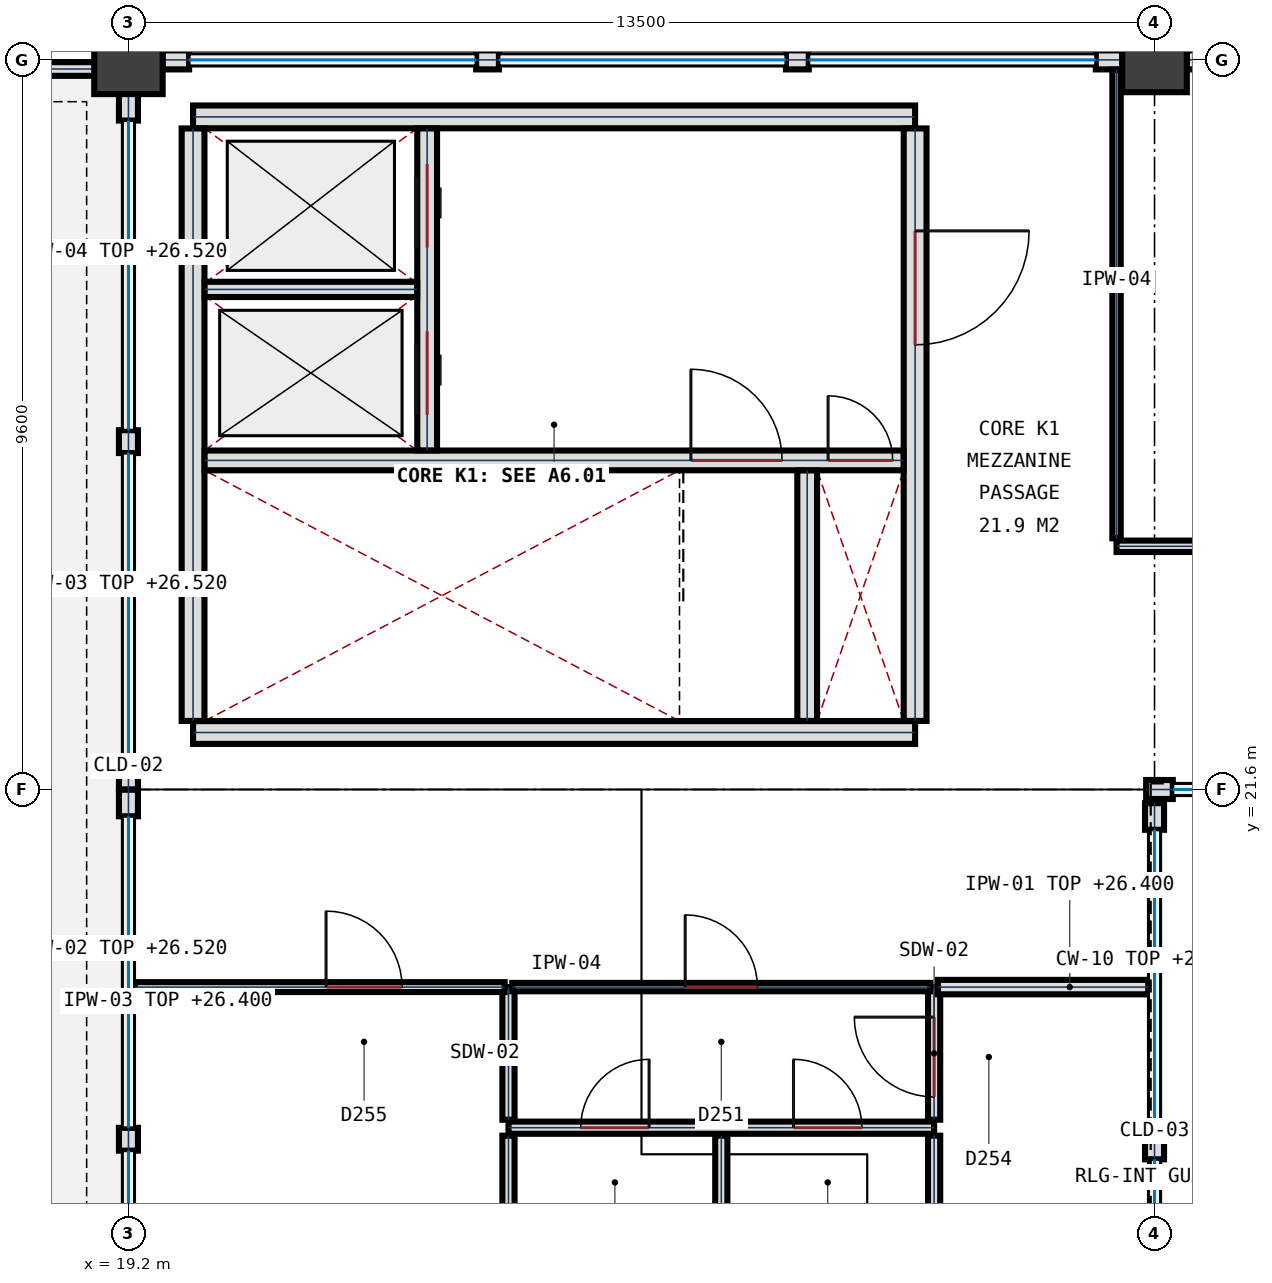
"""IFC4 building model, lengths in metres.
Left out: names, types, materials, properties, quantities, classifications, styles, units other than length and angle.
Written with IfcOpenShell. Run it as: python <this file> out.ifc"""

import sys

from ifc_helpers import new_model, si_unit, direction, frame, frame_2d, origin, origin_2d, place, context, subcontext, project, spatial, rectangle, circle, extrude, element, fill, save


model = new_model("IFC4")
c1 = context("Model", 3, precision=1e-05, world=origin(), true_north=direction((0.0, 1.0)))
c2 = subcontext(c1, "Body", "Model", "MODEL_VIEW")
j1 = project(units=[si_unit("LENGTHUNIT", "METRE"), si_unit("PLANEANGLEUNIT", "RADIAN")], contexts=[c1])
p1 = place(None, origin())
s1 = spatial("IfcSite", under=j1, at=p1, CompositionType="ELEMENT")
p2 = place(p1, origin())
s2 = spatial("IfcBuilding", under=s1, at=p2, CompositionType="ELEMENT")
p3 = place(p2, frame((0.0, 0.0, 23.4)))
s3 = spatial("IfcBuildingStorey", under=s2, at=p3, CompositionType="ELEMENT", Elevation=23.4)
p4 = place(p3, frame((19.2, 31.2, 0.0), z_axis=(0.0, 0.0, 1.0), x_axis=(1.0, 0.0, 0.0)))
e1 = element("IfcColumn", 1, at=p4, inside=s3, PredefinedType="COLUMN", context=c2, shape_type="SweptSolid", body=[
    extrude(circle(Radius=0.45, at=origin_2d()), origin(), (0.0, 0.0, 1.0), 4.5),
])
p5 = place(p3, frame((32.7, 31.2, 0.0), z_axis=(0.0, 0.0, 1.0), x_axis=(1.0, 0.0, 0.0)))
e2 = element("IfcColumn", 2, at=p5, inside=s3, PredefinedType="COLUMN", context=c2, shape_type="SweptSolid", body=[
    extrude(rectangle(XDim=0.85, YDim=0.85, at=origin_2d()), origin(), (0.0, 0.0, 1.0), 4.5),
])
p6 = place(p3, frame((19.2, 21.248, 0.0), z_axis=(0.0, 0.0, 1.0), x_axis=(0.0, 1.0, 0.0)))
e3 = element("IfcWall", 3, at=p6, inside=s3, PredefinedType="SOLIDWALL", context=c2, shape_type="SweptSolid", body=[
    extrude(rectangle(XDim=0.35, YDim=0.25, at=frame_2d((0.175, 0.0))), origin(), (0.0, 0.0, 1.0), 3.12),
])
p7 = place(p3, frame((19.2, 16.848, 0.0), z_axis=(0.0, 0.0, 1.0), x_axis=(0.0, 1.0, 0.0)))
e4 = element("IfcWall", 4, at=p7, inside=s3, PredefinedType="SOLIDWALL", context=c2, shape_type="SweptSolid", body=[
    extrude(rectangle(XDim=0.3, YDim=0.25, at=frame_2d((0.15, 0.0))), origin(), (0.0, 0.0, 1.0), 3.12),
])
for number, where, z_axis, x_axis in (
    (5, (19.2, 21.602, 0.0), (0.0, 0.0, 1.0), (0.0, 1.0, 0.0)),
    (6, (19.2, 30.402, 0.0), (0.0, 0.0, 1.0), (0.0, 1.0, 0.0)),
):
    element("IfcWall", number, at=place(p3, frame(where, z_axis=z_axis, x_axis=x_axis)), inside=s3, PredefinedType="SOLIDWALL", context=c2, shape_type="SweptSolid", body=[
        extrude(rectangle(XDim=0.35, YDim=0.25, at=frame_2d((0.175, 0.0))), origin(), (0.0, 0.0, 1.0), 3.12),
    ])
p8 = place(p3, frame((19.2, 26.027, 0.0), z_axis=(0.0, 0.0, 1.0), x_axis=(0.0, 1.0, 0.0)))
e7 = element("IfcWall", 7, at=p8, inside=s3, PredefinedType="SOLIDWALL", context=c2, shape_type="SweptSolid", body=[
    extrude(rectangle(XDim=0.3, YDim=0.25, at=frame_2d((0.15, 0.0))), origin(), (0.0, 0.0, 1.0), 3.12),
])
for number, where, z_axis, x_axis in (
    (8, (19.648, 31.2, 0.0), (0.0, 0.0, 1.0), (1.0, 0.0, 0.0)),
    (9, (31.927, 31.2, 0.0), (0.0, 0.0, 1.0), (1.0, 0.0, 0.0)),
):
    element("IfcWall", number, at=place(p3, frame(where, z_axis=z_axis, x_axis=x_axis)), inside=s3, PredefinedType="SOLIDWALL", context=c2, shape_type="SweptSolid", body=[
        extrude(rectangle(XDim=0.35, YDim=0.25, at=frame_2d((0.175, 0.0))), origin(), (0.0, 0.0, 1.0), 3.12),
    ])
p9 = place(p3, frame((23.774, 31.2, 0.0), z_axis=(0.0, 0.0, 1.0), x_axis=(1.0, 0.0, 0.0)))
e10 = element("IfcWall", 10, at=p9, inside=s3, PredefinedType="SOLIDWALL", context=c2, shape_type="SweptSolid", body=[
    extrude(rectangle(XDim=0.3, YDim=0.25, at=frame_2d((0.15, 0.0))), origin(), (0.0, 0.0, 1.0), 3.12),
])
p10 = place(p3, frame((27.851, 31.2, 0.0), z_axis=(0.0, 0.0, 1.0), x_axis=(1.0, 0.0, 0.0)))
e11 = element("IfcWall", 11, at=p10, inside=s3, PredefinedType="SOLIDWALL", context=c2, shape_type="SweptSolid", body=[
    extrude(rectangle(XDim=0.3, YDim=0.25, at=frame_2d((0.15, 0.0))), origin(), (0.0, 0.0, 1.0), 3.12),
])
for number, where, z_axis, x_axis in (
    (12, (33.123, 31.2, 0.0), (0.0, 0.0, 1.0), (1.0, 0.0, 0.0)),
    (13, (32.94, 21.6, 0.0), (0.0, 0.0, 1.0), (-1.0, 0.0, 0.0)),
    (14, (32.7, 21.42, 0.0), (0.0, 0.0, 1.0), (0.0, -1.0, 0.0)),
):
    element("IfcWall", number, at=place(p3, frame(where, z_axis=z_axis, x_axis=x_axis)), inside=s3, PredefinedType="SOLIDWALL", context=c2, shape_type="SweptSolid", body=[
        extrude(rectangle(XDim=0.35, YDim=0.25, at=frame_2d((0.175, 0.0))), origin(), (0.0, 0.0, 1.0), 3.12),
    ])
p11 = place(p3, frame((32.7, 17.034, 0.0), z_axis=(0.0, 0.0, 1.0), x_axis=(0.0, -1.0, 0.0)))
e15 = element("IfcWall", 15, at=p11, inside=s3, PredefinedType="SOLIDWALL", context=c2, shape_type="SweptSolid", body=[
    extrude(rectangle(XDim=0.3, YDim=0.25, at=frame_2d((0.15, 0.0))), origin(), (0.0, 0.0, 1.0), 3.12),
])
p12 = place(p3, frame((0.3, 31.08, 0.0), z_axis=(0.0, 0.0, 1.0), x_axis=(1.0, 0.0, 0.0)))
e16 = element("IfcWall", 16, at=p12, inside=s3, PredefinedType="PARAPET", context=c2, shape_type="SweptSolid", body=[
    extrude(rectangle(XDim=18.6, YDim=0.18, at=frame_2d((9.3, 0.0))), origin(), (0.0, 0.0, 1.0), 1.15),
])
for number, where, z_axis, x_axis in (
    (17, (29.55, 22.35, 0.0), (0.0, 0.0, 1.0), (-1.0, 0.0, 0.0)),
    (18, (20.05, 30.45, 0.0), (0.0, 0.0, 1.0), (1.0, 0.0, 0.0)),
):
    element("IfcWall", number, at=place(p3, frame(where, z_axis=z_axis, x_axis=x_axis)), inside=s3, PredefinedType="SHEAR", context=c2, shape_type="SweptSolid", body=[
        extrude(rectangle(XDim=9.5, YDim=0.3, at=frame_2d((4.75, 0.0))), origin(), (0.0, 0.0, 1.0), 3.15),
    ])
p13 = place(p3, frame((20.05, 22.502, 0.0), z_axis=(0.0, 0.0, 1.0), x_axis=(0.0, 1.0, 0.0)))
e19 = element("IfcWall", 19, at=p13, inside=s3, PredefinedType="SHEAR", context=c2, shape_type="SweptSolid", body=[
    extrude(rectangle(XDim=7.796, YDim=0.3, at=frame_2d((3.898, 0.0))), origin(), (0.0, 0.0, 1.0), 3.15),
])
p14 = place(p3, frame((29.55, 30.298, 0.0), z_axis=(0.0, 0.0, 1.0), x_axis=(0.0, -1.0, 0.0)))
e20 = element("IfcWall", 20, at=p14, inside=s3, PredefinedType="SHEAR", context=c2, shape_type="SweptSolid", body=[
    extrude(rectangle(XDim=7.796, YDim=0.3, at=frame_2d((3.898, 0.0))), origin(), (0.0, 0.0, 1.0), 3.15),
])
p15 = place(p14, frame((1.348, 0.0, 0.0)))
e21 = element("IfcOpeningElement", 21, at=p15, cuts=e20, PredefinedType="OPENING", context=c2, shape_type="SweptSolid", body=[
    extrude(rectangle(XDim=1.5, YDim=2.25, at=frame_2d((0.75, 1.125))), frame((0.0, 0.16, 0.0), z_axis=(0.0, -1.0, 0.0), x_axis=(1.0, 0.0, 0.0)), (0.0, 0.0, 1.0), 0.32),
])
p16 = place(p3, frame((20.202, 25.93, 0.0), z_axis=(0.0, 0.0, 1.0), x_axis=(1.0, 0.0, 0.0)))
e22 = element("IfcWall", 22, at=p16, inside=s3, PredefinedType="SHEAR", context=c2, shape_type="SweptSolid", body=[
    extrude(rectangle(XDim=9.196, YDim=0.26, at=frame_2d((4.598, 0.0))), origin(), (0.0, 0.0, 1.0), 3.15),
])
p17 = place(p16, frame((6.398, 0.0, 0.0)))
e23 = element("IfcOpeningElement", 23, at=p17, cuts=e22, PredefinedType="OPENING", context=c2, shape_type="SweptSolid", body=[
    extrude(rectangle(XDim=1.2, YDim=2.2, at=frame_2d((0.6, 1.1))), frame((0.0, 0.14, 0.0), z_axis=(0.0, -1.0, 0.0), x_axis=(1.0, 0.0, 0.0)), (0.0, 0.0, 1.0), 0.28),
])
p18 = place(p16, frame((8.203, 0.0, 0.0)))
e24 = element("IfcOpeningElement", 24, at=p18, cuts=e22, PredefinedType="OPENING", context=c2, shape_type="SweptSolid", body=[
    extrude(rectangle(XDim=0.85, YDim=2.05, at=frame_2d((0.425, 1.025))), frame((0.0, 0.14, 0.0), z_axis=(0.0, -1.0, 0.0), x_axis=(1.0, 0.0, 0.0)), (0.0, 0.0, 1.0), 0.28),
])
p19 = place(p3, frame((28.13, 22.502, 0.0), z_axis=(0.0, 0.0, 1.0), x_axis=(0.0, 1.0, 0.0)))
e25 = element("IfcWall", 25, at=p19, inside=s3, PredefinedType="SHEAR", context=c2, shape_type="SweptSolid", body=[
    extrude(rectangle(XDim=3.296, YDim=0.26, at=frame_2d((1.648, 0.0))), origin(), (0.0, 0.0, 1.0), 3.15),
])
p20 = place(p3, frame((23.13, 26.062, 0.0), z_axis=(0.0, 0.0, 1.0), x_axis=(0.0, 1.0, 0.0)))
e26 = element("IfcWall", 26, at=p20, inside=s3, PredefinedType="SHEAR", context=c2, shape_type="SweptSolid", body=[
    extrude(rectangle(XDim=4.236, YDim=0.26, at=frame_2d((2.118, 0.0))), origin(), (0.0, 0.0, 1.0), 3.15),
])
p21 = place(p20, frame((0.468, 0.0, 0.0)))
e27 = element("IfcOpeningElement", 27, at=p21, cuts=e26, PredefinedType="OPENING", context=c2, shape_type="SweptSolid", body=[
    extrude(rectangle(XDim=1.1, YDim=2.15, at=frame_2d((0.55, 1.075))), frame((0.0, 0.14, 0.0), z_axis=(0.0, -1.0, 0.0), x_axis=(1.0, 0.0, 0.0)), (0.0, 0.0, 1.0), 0.28),
])
p22 = place(p20, frame((2.668, 0.0, 0.0)))
e28 = element("IfcOpeningElement", 28, at=p22, cuts=e26, PredefinedType="OPENING", context=c2, shape_type="SweptSolid", body=[
    extrude(rectangle(XDim=1.1, YDim=2.15, at=frame_2d((0.55, 1.075))), frame((0.0, 0.14, 0.0), z_axis=(0.0, -1.0, 0.0), x_axis=(1.0, 0.0, 0.0)), (0.0, 0.0, 1.0), 0.28),
])
p23 = place(p3, frame((20.202, 28.18, 0.0), z_axis=(0.0, 0.0, 1.0), x_axis=(1.0, 0.0, 0.0)))
e29 = element("IfcWall", 29, at=p23, inside=s3, PredefinedType="PLUMBINGWALL", context=c2, shape_type="SweptSolid", body=[
    extrude(rectangle(XDim=2.796, YDim=0.2, at=frame_2d((1.398, 0.0))), origin(), (0.0, 0.0, 1.0), 3.1),
])
p24 = place(p3, frame((24.2, 17.15, 0.0), z_axis=(0.0, 0.0, 1.0), x_axis=(1.0, 0.0, 0.0)))
e30 = element("IfcWall", 30, at=p24, inside=s3, PredefinedType="PLUMBINGWALL", context=c2, shape_type="SweptSolid", body=[
    extrude(rectangle(XDim=5.6, YDim=0.16, at=frame_2d((2.8, 0.0))), origin(), (0.0, 0.0, 1.0), 3.1),
])
p25 = place(p24, frame((0.95, 0.0, 0.0)))
e31 = element("IfcOpeningElement", 31, at=p25, cuts=e30, PredefinedType="OPENING", context=c2, shape_type="SweptSolid", body=[
    extrude(rectangle(XDim=0.9, YDim=2.1, at=frame_2d((0.45, 1.05))), frame((0.0, 0.09, 0.0), z_axis=(0.0, -1.0, 0.0), x_axis=(1.0, 0.0, 0.0)), (0.0, 0.0, 1.0), 0.18),
])
p26 = place(p24, frame((3.75, 0.0, 0.0)))
e32 = element("IfcOpeningElement", 32, at=p26, cuts=e30, PredefinedType="OPENING", context=c2, shape_type="SweptSolid", body=[
    extrude(rectangle(XDim=0.9, YDim=2.1, at=frame_2d((0.45, 1.05))), frame((0.0, 0.09, 0.0), z_axis=(0.0, -1.0, 0.0), x_axis=(1.0, 0.0, 0.0)), (0.0, 0.0, 1.0), 0.18),
])
p27 = place(p3, frame((24.2, 12.083, 0.0), z_axis=(0.0, 0.0, 1.0), x_axis=(0.0, 1.0, 0.0)))
e33 = element("IfcWall", 33, at=p27, inside=s3, PredefinedType="PLUMBINGWALL", context=c2, shape_type="SweptSolid", body=[
    extrude(rectangle(XDim=4.962, YDim=0.16, at=frame_2d((2.481, 0.0))), origin(), (0.0, 0.0, 1.0), 3.0),
])
p28 = place(p3, frame((24.2, 17.255, 0.0), z_axis=(0.0, 0.0, 1.0), x_axis=(0.0, 1.0, 0.0)))
e34 = element("IfcWall", 34, at=p28, inside=s3, PredefinedType="PLUMBINGWALL", context=c2, shape_type="SweptSolid", body=[
    extrude(rectangle(XDim=1.745, YDim=0.16, at=frame_2d((0.873, 0.0))), origin(), (0.0, 0.0, 1.0), 3.1),
])
p29 = place(p3, frame((27.0, 12.083, 0.0), z_axis=(0.0, 0.0, 1.0), x_axis=(0.0, 1.0, 0.0)))
e35 = element("IfcWall", 35, at=p29, inside=s3, PredefinedType="PLUMBINGWALL", context=c2, shape_type="SweptSolid", body=[
    extrude(rectangle(XDim=4.962, YDim=0.16, at=frame_2d((2.481, 0.0))), origin(), (0.0, 0.0, 1.0), 3.0),
])
p30 = place(p3, frame((29.8, 12.083, 0.0), z_axis=(0.0, 0.0, 1.0), x_axis=(0.0, 1.0, 0.0)))
e36 = element("IfcWall", 36, at=p30, inside=s3, PredefinedType="PLUMBINGWALL", context=c2, shape_type="SweptSolid", body=[
    extrude(rectangle(XDim=4.962, YDim=0.16, at=frame_2d((2.481, 0.0))), origin(), (0.0, 0.0, 1.0), 2.975),
])
p31 = place(p3, frame((29.8, 17.255, 0.0), z_axis=(0.0, 0.0, 1.0), x_axis=(0.0, 1.0, 0.0)))
e37 = element("IfcWall", 37, at=p31, inside=s3, PredefinedType="PLUMBINGWALL", context=c2, shape_type="SweptSolid", body=[
    extrude(rectangle(XDim=1.745, YDim=0.16, at=frame_2d((0.873, 0.0))), origin(), (0.0, 0.0, 1.0), 3.1),
])
p32 = place(p31, frame((0.3, 0.0, 0.0)))
e38 = element("IfcOpeningElement", 38, at=p32, cuts=e37, PredefinedType="OPENING", context=c2, shape_type="SweptSolid", body=[
    extrude(rectangle(XDim=1.05, YDim=2.15, at=frame_2d((0.525, 1.075))), frame((0.0, 0.09, 0.0), z_axis=(0.0, -1.0, 0.0), x_axis=(1.0, 0.0, 0.0)), (0.0, 0.0, 1.0), 0.18),
])
p33 = place(p3, frame((19.283, 19.0, 0.0), z_axis=(0.0, 0.0, 1.0), x_axis=(1.0, 0.0, 0.0)))
e39 = element("IfcWall", 39, at=p33, inside=s3, PredefinedType="PARTITIONING", context=c2, shape_type="SweptSolid", body=[
    extrude(rectangle(XDim=4.867, YDim=0.13, at=frame_2d((2.434, 0.0))), origin(), (0.0, 0.0, 1.0), 3.0),
])
p34 = place(p33, frame((2.517, 0.0, 0.0)))
e40 = element("IfcOpeningElement", 40, at=p34, cuts=e39, PredefinedType="OPENING", context=c2, shape_type="SweptSolid", body=[
    extrude(rectangle(XDim=1.0, YDim=2.2, at=frame_2d((0.5, 1.1))), frame((0.0, 0.075, 0.0), z_axis=(0.0, -1.0, 0.0), x_axis=(1.0, 0.0, 0.0)), (0.0, 0.0, 1.0), 0.15),
])
p35 = place(p3, frame((24.25, 19.0, 0.0), z_axis=(0.0, 0.0, 1.0), x_axis=(1.0, 0.0, 0.0)))
e41 = element("IfcWall", 41, at=p35, inside=s3, PredefinedType="PARTITIONING", context=c2, shape_type="SweptSolid", body=[
    extrude(rectangle(XDim=5.5, YDim=0.11, at=frame_2d((2.75, 0.0))), origin(), (0.0, 0.0, 1.0), 3.1),
])
p36 = place(p35, frame((2.275, 0.0, 0.0)))
e42 = element("IfcOpeningElement", 42, at=p36, cuts=e41, PredefinedType="OPENING", context=c2, shape_type="SweptSolid", body=[
    extrude(rectangle(XDim=0.95, YDim=2.15, at=frame_2d((0.475, 1.075))), frame((0.0, 0.065, 0.0), z_axis=(0.0, -1.0, 0.0), x_axis=(1.0, 0.0, 0.0)), (0.0, 0.0, 1.0), 0.13),
])
p37 = place(p3, frame((29.85, 19.0, 0.0), z_axis=(0.0, 0.0, 1.0), x_axis=(1.0, 0.0, 0.0)))
e43 = element("IfcWall", 43, at=p37, inside=s3, PredefinedType="PARTITIONING", context=c2, shape_type="SweptSolid", body=[
    extrude(rectangle(XDim=2.767, YDim=0.19, at=frame_2d((1.383, 0.0))), origin(), (0.0, 0.0, 1.0), 3.0),
])
p38 = place(p3, frame((32.2, 24.8, 0.0), z_axis=(0.0, 0.0, 1.0), x_axis=(1.0, 0.0, 0.0)))
e44 = element("IfcWall", 44, at=p38, inside=s3, PredefinedType="PARTITIONING", context=c2, shape_type="SweptSolid", body=[
    extrude(rectangle(XDim=14.697, YDim=0.15, at=frame_2d((7.349, 0.0))), origin(), (0.0, 0.0, 1.0), 3.1),
])
p39 = place(p38, frame((6.375, 0.0, 0.0)))
e45 = element("IfcOpeningElement", 45, at=p39, cuts=e44, PredefinedType="OPENING", context=c2, shape_type="SweptSolid", body=[
    extrude(rectangle(XDim=1.85, YDim=2.35, at=frame_2d((0.925, 1.175))), frame((0.0, 0.085, 0.0), z_axis=(0.0, -1.0, 0.0), x_axis=(1.0, 0.0, 0.0)), (0.0, 0.0, 1.0), 0.17),
])
p40 = place(p3, frame((32.2, 24.905, 0.0), z_axis=(0.0, 0.0, 1.0), x_axis=(0.0, 1.0, 0.0)))
e46 = element("IfcWall", 46, at=p40, inside=s3, PredefinedType="PARTITIONING", context=c2, shape_type="SweptSolid", body=[
    extrude(rectangle(XDim=6.166, YDim=0.11, at=frame_2d((3.083, 0.0))), origin(), (0.0, 0.0, 1.0), 3.1),
])
p41 = place(p15, origin())
e47 = element("IfcDoor", 47, at=p41, inside=s3, OperationType="SINGLE_SWING_LEFT", PredefinedType="DOOR", context=c2, shape_type="SweptSolid", body=[
    extrude(rectangle(XDim=1.5, YDim=2.25, at=frame_2d((0.75, 1.125))), frame((0.0, 0.032, 0.0), z_axis=(0.0, -1.0, 0.0), x_axis=(1.0, 0.0, 0.0)), (0.0, 0.0, 1.0), 0.065),
])
fill(e21, e47)
p42 = place(p17, origin())
e48 = element("IfcDoor", 48, at=p42, inside=s3, OperationType="SINGLE_SWING_LEFT", PredefinedType="DOOR", context=c2, shape_type="SweptSolid", body=[
    extrude(rectangle(XDim=1.2, YDim=2.2, at=frame_2d((0.6, 1.1))), frame((0.0, 0.032, 0.0), z_axis=(0.0, -1.0, 0.0), x_axis=(1.0, 0.0, 0.0)), (0.0, 0.0, 1.0), 0.065),
])
fill(e23, e48)
p43 = place(p18, origin())
e49 = element("IfcDoor", 49, at=p43, inside=s3, OperationType="SINGLE_SWING_LEFT", PredefinedType="DOOR", context=c2, shape_type="SweptSolid", body=[
    extrude(rectangle(XDim=0.85, YDim=2.05, at=frame_2d((0.425, 1.025))), frame((0.0, 0.032, 0.0), z_axis=(0.0, -1.0, 0.0), x_axis=(1.0, 0.0, 0.0)), (0.0, 0.0, 1.0), 0.065),
])
fill(e24, e49)
p44 = place(p21, origin())
e50 = element("IfcDoor", 50, at=p44, inside=s3, OperationType="SLIDING_TO_LEFT", PredefinedType="DOOR", context=c2, shape_type="SweptSolid", body=[
    extrude(rectangle(XDim=1.1, YDim=2.15, at=frame_2d((0.55, 1.075))), frame((0.0, 0.032, 0.0), z_axis=(0.0, -1.0, 0.0), x_axis=(1.0, 0.0, 0.0)), (0.0, 0.0, 1.0), 0.065),
])
fill(e27, e50)
p45 = place(p22, origin())
e51 = element("IfcDoor", 51, at=p45, inside=s3, OperationType="SLIDING_TO_LEFT", PredefinedType="DOOR", context=c2, shape_type="SweptSolid", body=[
    extrude(rectangle(XDim=1.1, YDim=2.15, at=frame_2d((0.55, 1.075))), frame((0.0, 0.032, 0.0), z_axis=(0.0, -1.0, 0.0), x_axis=(1.0, 0.0, 0.0)), (0.0, 0.0, 1.0), 0.065),
])
fill(e28, e51)
p46 = place(p36, origin())
e52 = element("IfcDoor", 52, at=p46, inside=s3, OperationType="SINGLE_SWING_LEFT", PredefinedType="DOOR", context=c2, shape_type="SweptSolid", body=[
    extrude(rectangle(XDim=0.95, YDim=2.15, at=frame_2d((0.475, 1.075))), frame((0.0, 0.032, 0.0), z_axis=(0.0, -1.0, 0.0), x_axis=(1.0, 0.0, 0.0)), (0.0, 0.0, 1.0), 0.065),
])
fill(e42, e52)
p47 = place(p25, origin())
e53 = element("IfcDoor", 53, at=p47, inside=s3, OperationType="SINGLE_SWING_RIGHT", PredefinedType="DOOR", context=c2, shape_type="SweptSolid", body=[
    extrude(rectangle(XDim=0.9, YDim=2.1, at=frame_2d((0.45, 1.05))), frame((0.0, 0.032, 0.0), z_axis=(0.0, -1.0, 0.0), x_axis=(1.0, 0.0, 0.0)), (0.0, 0.0, 1.0), 0.065),
])
fill(e31, e53)
p48 = place(p26, origin())
e54 = element("IfcDoor", 54, at=p48, inside=s3, OperationType="SINGLE_SWING_LEFT", PredefinedType="DOOR", context=c2, shape_type="SweptSolid", body=[
    extrude(rectangle(XDim=0.9, YDim=2.1, at=frame_2d((0.45, 1.05))), frame((0.0, 0.032, 0.0), z_axis=(0.0, -1.0, 0.0), x_axis=(1.0, 0.0, 0.0)), (0.0, 0.0, 1.0), 0.065),
])
fill(e32, e54)
p49 = place(p32, origin())
e55 = element("IfcDoor", 55, at=p49, inside=s3, OperationType="SINGLE_SWING_RIGHT", PredefinedType="DOOR", context=c2, shape_type="SweptSolid", body=[
    extrude(rectangle(XDim=1.05, YDim=2.15, at=frame_2d((0.525, 1.075))), frame((0.0, 0.032, 0.0), z_axis=(0.0, -1.0, 0.0), x_axis=(1.0, 0.0, 0.0)), (0.0, 0.0, 1.0), 0.065),
])
fill(e38, e55)
p50 = place(p34, origin())
e56 = element("IfcDoor", 56, at=p50, inside=s3, OperationType="SINGLE_SWING_LEFT", PredefinedType="DOOR", context=c2, shape_type="SweptSolid", body=[
    extrude(rectangle(XDim=1.0, YDim=2.2, at=frame_2d((0.5, 1.1))), frame((0.0, 0.032, 0.0), z_axis=(0.0, -1.0, 0.0), x_axis=(1.0, 0.0, 0.0)), (0.0, 0.0, 1.0), 0.065),
])
fill(e40, e56)
save(model, sys.argv[1])
